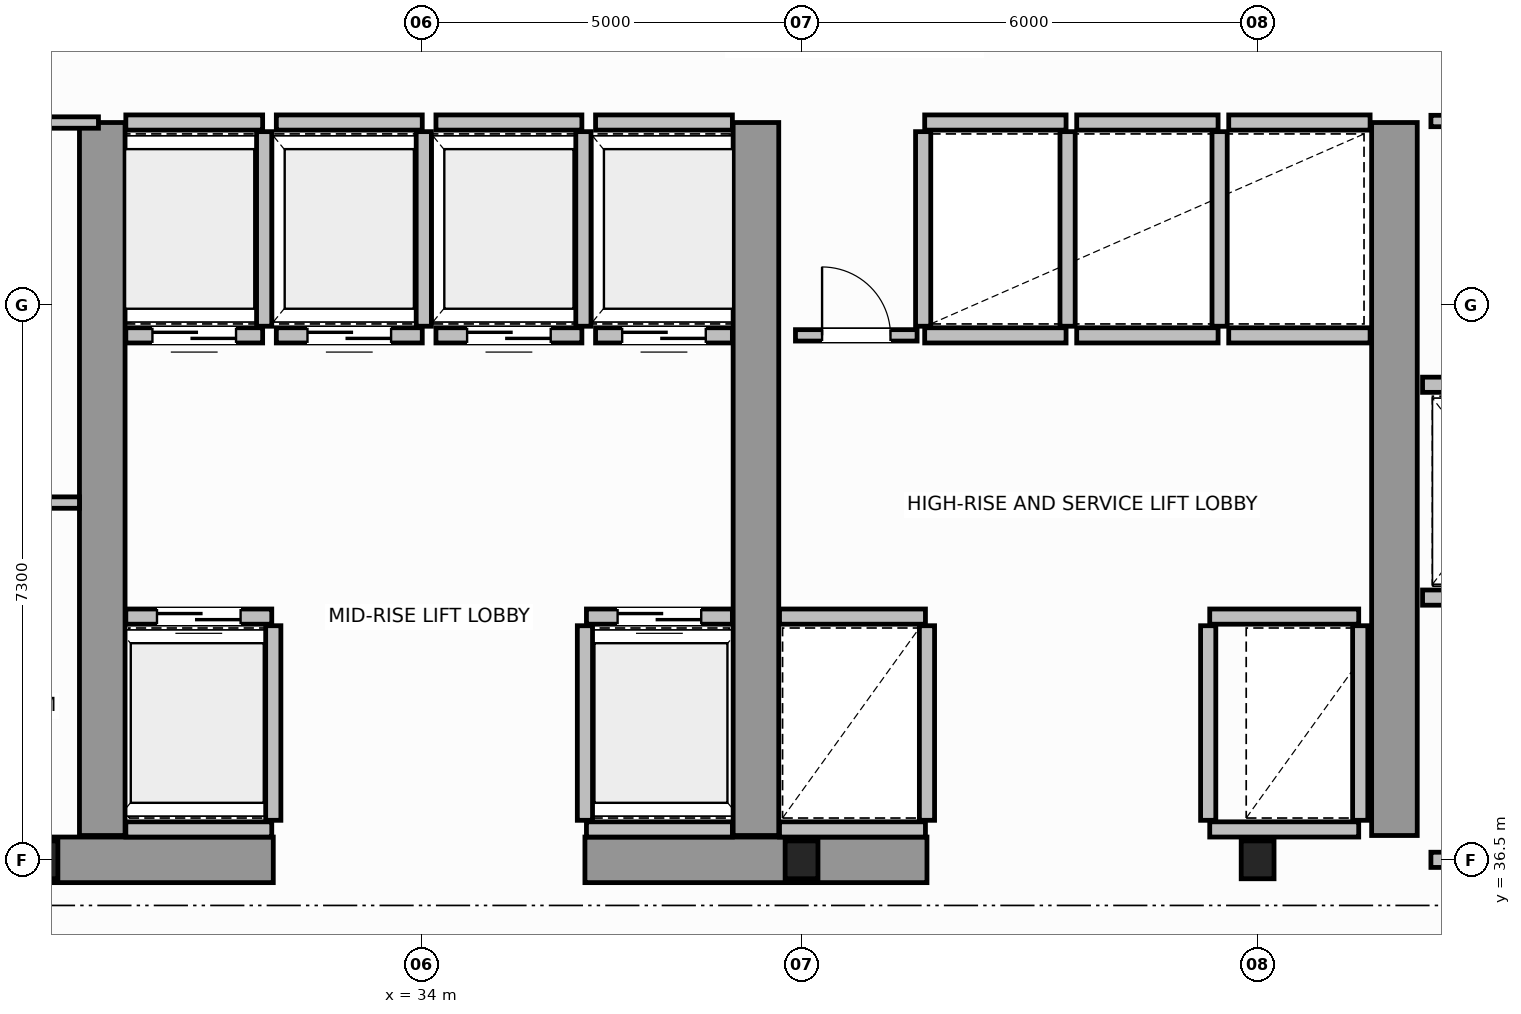
"""IFC4 building model, lengths in metres.
Left out: names, types, materials, properties, quantities, classifications, styles, units other than length and angle.
Written with IfcOpenShell. Run it as: python <this file> out.ifc"""

import sys

from ifc_helpers import new_model, si_unit, direction, frame, frame_2d, origin, origin_2d, place, context, subcontext, project, spatial, rectangle, i_section, extrude, source, transform, mapped, element, fill, save


model = new_model("IFC4")
c1 = context("Model", 3, precision=1e-05, world=origin(), true_north=direction((0.0, 1.0)))
c2 = subcontext(c1, "Body", "Model", "MODEL_VIEW")
j1 = project(units=[si_unit("LENGTHUNIT", "METRE"), si_unit("PLANEANGLEUNIT", "RADIAN")], contexts=[c1])
p1 = place(None, origin())
s1 = spatial("IfcSite", under=j1, at=p1, CompositionType="ELEMENT")
p2 = place(p1, origin())
s2 = spatial("IfcBuilding", under=s1, at=p2, CompositionType="ELEMENT")
p3 = place(p2, frame((0.0, 0.0, 180.4)))
s3 = spatial("IfcBuildingStorey", under=s2, at=p3, CompositionType="ELEMENT", Elevation=180.4)
m1 = source(origin(), c2, "Body", "SweptSolid", [
    extrude(i_section(OverallWidth=0.432, OverallDepth=0.498, WebThickness=0.055, FlangeThickness=0.068, FilletRadius=0.015, at=origin_2d()), origin(), (0.0, 0.0, 1.0), 3.8),
])
for number, where, z_axis, x_axis in (
    (1, (29.0, 36.5, 0.0), (0.0, 0.0, 1.0), (1.0, 0.0, 0.0)),
    (2, (39.0, 36.5, 0.0), (0.0, 0.0, 1.0), (1.0, 0.0, 0.0)),
    (3, (45.0, 36.5, 0.0), (0.0, 0.0, 1.0), (1.0, 0.0, 0.0)),
):
    element("IfcColumn", number, at=place(p3, frame(where, z_axis=z_axis, x_axis=x_axis)), inside=s3, PredefinedType="COLUMN", context=c2, shape_type="MappedRepresentation", body=[
        mapped(m1, transform((0.0, 0.0, 0.0), scale=1.0)),
    ])
for number, where, z_axis, x_axis in (
    (4, (27.55, 36.5, 0.0), (0.0, 0.0, 1.0), (1.0, 0.0, 0.0)),
    (5, (36.15, 36.5, 0.0), (0.0, 0.0, 1.0), (1.0, 0.0, 0.0)),
):
    element("IfcWall", number, at=place(p3, frame(where, z_axis=z_axis, x_axis=x_axis)), inside=s3, PredefinedType="SHEAR", context=c2, shape_type="SweptSolid", body=[
        extrude(rectangle(XDim=4.5, YDim=0.6, at=frame_2d((2.25, 0.0))), origin(), (0.0, 0.0, 1.0), 3.8),
    ])
for number, where, z_axis, x_axis in (
    (6, (29.8, 36.82, 0.0), (0.0, 0.0, 1.0), (0.0, 1.0, 0.0)),
    (7, (38.4, 36.82, 0.0), (0.0, 0.0, 1.0), (0.0, 1.0, 0.0)),
    (8, (46.8, 36.82, 0.0), (0.0, 0.0, 1.0), (0.0, 1.0, 0.0)),
):
    element("IfcWall", number, at=place(p3, frame(where, z_axis=z_axis, x_axis=x_axis)), inside=s3, PredefinedType="SHEAR", context=c2, shape_type="SweptSolid", body=[
        extrude(rectangle(XDim=9.38, YDim=0.6, at=frame_2d((4.69, 0.0))), origin(), (0.0, 0.0, 1.0), 3.8),
    ])
p4 = place(p3, frame((47.28, 36.5, 0.0), z_axis=(0.0, 0.0, 1.0), x_axis=(1.0, 0.0, 0.0)))
e9 = element("IfcWall", 9, at=p4, inside=s3, PredefinedType="SOLIDWALL", context=c2, shape_type="SweptSolid", body=[
    extrude(rectangle(XDim=2.47, YDim=0.2, at=frame_2d((1.235, 0.0))), origin(), (0.0, 0.0, 1.0), 2.57),
])
p5 = place(p4, frame((0.65, 0.0, 0.0)))
e10 = element("IfcOpeningElement", 10, at=p5, cuts=e9, PredefinedType="OPENING", context=c2, shape_type="SweptSolid", body=[
    extrude(rectangle(XDim=1.1, YDim=2.15, at=frame_2d((0.55, 1.075))), frame((0.0, 0.11, 0.0), z_axis=(0.0, -1.0, 0.0), x_axis=(1.0, 0.0, 0.0)), (0.0, 0.0, 1.0), 0.22),
])
p6 = place(p3, frame((30.11, 39.7, 0.0), z_axis=(0.0, 0.0, 1.0), x_axis=(1.0, 0.0, 0.0)))
e11 = element("IfcWall", 11, at=p6, inside=s3, PredefinedType="SOLIDWALL", context=c2, shape_type="SweptSolid", body=[
    extrude(rectangle(XDim=1.92, YDim=0.2, at=frame_2d((0.96, 0.0))), origin(), (0.0, 0.0, 1.0), 3.58),
])
p7 = place(p6, frame((0.41, 0.0, 0.0)))
e12 = element("IfcOpeningElement", 12, at=p7, cuts=e11, PredefinedType="OPENING", context=c2, shape_type="SweptSolid", body=[
    extrude(rectangle(XDim=1.1, YDim=2.15, at=frame_2d((0.55, 1.075))), frame((0.0, 0.11, 0.0), z_axis=(0.0, -1.0, 0.0), x_axis=(1.0, 0.0, 0.0)), (0.0, 0.0, 1.0), 0.22),
])
p8 = place(p3, frame((30.11, 36.9, 0.0), z_axis=(0.0, 0.0, 1.0), x_axis=(1.0, 0.0, 0.0)))
e13 = element("IfcWall", 13, at=p8, inside=s3, PredefinedType="SOLIDWALL", context=c2, shape_type="SweptSolid", body=[
    extrude(rectangle(XDim=1.92, YDim=0.2, at=frame_2d((0.96, 0.0))), origin(), (0.0, 0.0, 1.0), 3.58),
])
p9 = place(p3, frame((32.05, 37.02, 0.0), z_axis=(0.0, 0.0, 1.0), x_axis=(0.0, 1.0, 0.0)))
e14 = element("IfcWall", 14, at=p9, inside=s3, PredefinedType="SOLIDWALL", context=c2, shape_type="SweptSolid", body=[
    extrude(rectangle(XDim=2.56, YDim=0.2, at=frame_2d((1.28, 0.0))), origin(), (0.0, 0.0, 1.0), 3.58),
])
p10 = place(p3, frame((36.17, 39.7, 0.0), z_axis=(0.0, 0.0, 1.0), x_axis=(1.0, 0.0, 0.0)))
e15 = element("IfcWall", 15, at=p10, inside=s3, PredefinedType="SOLIDWALL", context=c2, shape_type="SweptSolid", body=[
    extrude(rectangle(XDim=1.92, YDim=0.2, at=frame_2d((0.96, 0.0))), origin(), (0.0, 0.0, 1.0), 3.58),
])
p11 = place(p10, frame((0.41, 0.0, 0.0)))
e16 = element("IfcOpeningElement", 16, at=p11, cuts=e15, PredefinedType="OPENING", context=c2, shape_type="SweptSolid", body=[
    extrude(rectangle(XDim=1.1, YDim=2.15, at=frame_2d((0.55, 1.075))), frame((0.0, 0.11, 0.0), z_axis=(0.0, -1.0, 0.0), x_axis=(1.0, 0.0, 0.0)), (0.0, 0.0, 1.0), 0.22),
])
p12 = place(p3, frame((36.17, 36.9, 0.0), z_axis=(0.0, 0.0, 1.0), x_axis=(1.0, 0.0, 0.0)))
e17 = element("IfcWall", 17, at=p12, inside=s3, PredefinedType="SOLIDWALL", context=c2, shape_type="SweptSolid", body=[
    extrude(rectangle(XDim=1.92, YDim=0.2, at=frame_2d((0.96, 0.0))), origin(), (0.0, 0.0, 1.0), 3.58),
])
p13 = place(p3, frame((36.15, 37.02, 0.0), z_axis=(0.0, 0.0, 1.0), x_axis=(0.0, 1.0, 0.0)))
e18 = element("IfcWall", 18, at=p13, inside=s3, PredefinedType="SOLIDWALL", context=c2, shape_type="SweptSolid", body=[
    extrude(rectangle(XDim=2.56, YDim=0.2, at=frame_2d((1.28, 0.0))), origin(), (0.0, 0.0, 1.0), 3.58),
])
p14 = place(p3, frame((30.11, 43.4, 0.0), z_axis=(0.0, 0.0, 1.0), x_axis=(1.0, 0.0, 0.0)))
e19 = element("IfcWall", 19, at=p14, inside=s3, PredefinedType="SOLIDWALL", context=c2, shape_type="SweptSolid", body=[
    extrude(rectangle(XDim=1.8, YDim=0.2, at=frame_2d((0.9, 0.0))), origin(), (0.0, 0.0, 1.0), 3.58),
])
p15 = place(p14, frame((0.35, 0.0, 0.0)))
e20 = element("IfcOpeningElement", 20, at=p15, cuts=e19, PredefinedType="OPENING", context=c2, shape_type="SweptSolid", body=[
    extrude(rectangle(XDim=1.1, YDim=2.15, at=frame_2d((0.55, 1.075))), frame((0.0, 0.11, 0.0), z_axis=(0.0, -1.0, 0.0), x_axis=(1.0, 0.0, 0.0)), (0.0, 0.0, 1.0), 0.22),
])
p16 = place(p3, frame((30.11, 46.2, 0.0), z_axis=(0.0, 0.0, 1.0), x_axis=(1.0, 0.0, 0.0)))
e21 = element("IfcWall", 21, at=p16, inside=s3, PredefinedType="SOLIDWALL", context=c2, shape_type="SweptSolid", body=[
    extrude(rectangle(XDim=1.8, YDim=0.2, at=frame_2d((0.9, 0.0))), origin(), (0.0, 0.0, 1.0), 3.58),
])
p17 = place(p3, frame((31.93, 43.52, 0.0), z_axis=(0.0, 0.0, 1.0), x_axis=(0.0, 1.0, 0.0)))
e22 = element("IfcWall", 22, at=p17, inside=s3, PredefinedType="SOLIDWALL", context=c2, shape_type="SweptSolid", body=[
    extrude(rectangle(XDim=2.56, YDim=0.2, at=frame_2d((1.28, 0.0))), origin(), (0.0, 0.0, 1.0), 3.58),
])
p18 = place(p3, frame((32.09, 43.4, 0.0), z_axis=(0.0, 0.0, 1.0), x_axis=(1.0, 0.0, 0.0)))
e23 = element("IfcWall", 23, at=p18, inside=s3, PredefinedType="SOLIDWALL", context=c2, shape_type="SweptSolid", body=[
    extrude(rectangle(XDim=1.92, YDim=0.2, at=frame_2d((0.96, 0.0))), origin(), (0.0, 0.0, 1.0), 3.58),
])
p19 = place(p18, frame((0.41, 0.0, 0.0)))
e24 = element("IfcOpeningElement", 24, at=p19, cuts=e23, PredefinedType="OPENING", context=c2, shape_type="SweptSolid", body=[
    extrude(rectangle(XDim=1.1, YDim=2.15, at=frame_2d((0.55, 1.075))), frame((0.0, 0.11, 0.0), z_axis=(0.0, -1.0, 0.0), x_axis=(1.0, 0.0, 0.0)), (0.0, 0.0, 1.0), 0.22),
])
p20 = place(p3, frame((32.09, 46.2, 0.0), z_axis=(0.0, 0.0, 1.0), x_axis=(1.0, 0.0, 0.0)))
e25 = element("IfcWall", 25, at=p20, inside=s3, PredefinedType="SOLIDWALL", context=c2, shape_type="SweptSolid", body=[
    extrude(rectangle(XDim=1.92, YDim=0.2, at=frame_2d((0.96, 0.0))), origin(), (0.0, 0.0, 1.0), 3.58),
])
p21 = place(p3, frame((34.03, 43.52, 0.0), z_axis=(0.0, 0.0, 1.0), x_axis=(0.0, 1.0, 0.0)))
e26 = element("IfcWall", 26, at=p21, inside=s3, PredefinedType="SOLIDWALL", context=c2, shape_type="SweptSolid", body=[
    extrude(rectangle(XDim=2.56, YDim=0.2, at=frame_2d((1.28, 0.0))), origin(), (0.0, 0.0, 1.0), 3.58),
])
p22 = place(p3, frame((34.19, 43.4, 0.0), z_axis=(0.0, 0.0, 1.0), x_axis=(1.0, 0.0, 0.0)))
e27 = element("IfcWall", 27, at=p22, inside=s3, PredefinedType="SOLIDWALL", context=c2, shape_type="SweptSolid", body=[
    extrude(rectangle(XDim=1.92, YDim=0.2, at=frame_2d((0.96, 0.0))), origin(), (0.0, 0.0, 1.0), 3.58),
])
p23 = place(p22, frame((0.41, 0.0, 0.0)))
e28 = element("IfcOpeningElement", 28, at=p23, cuts=e27, PredefinedType="OPENING", context=c2, shape_type="SweptSolid", body=[
    extrude(rectangle(XDim=1.1, YDim=2.15, at=frame_2d((0.55, 1.075))), frame((0.0, 0.11, 0.0), z_axis=(0.0, -1.0, 0.0), x_axis=(1.0, 0.0, 0.0)), (0.0, 0.0, 1.0), 0.22),
])
p24 = place(p3, frame((34.19, 46.2, 0.0), z_axis=(0.0, 0.0, 1.0), x_axis=(1.0, 0.0, 0.0)))
e29 = element("IfcWall", 29, at=p24, inside=s3, PredefinedType="SOLIDWALL", context=c2, shape_type="SweptSolid", body=[
    extrude(rectangle(XDim=1.92, YDim=0.2, at=frame_2d((0.96, 0.0))), origin(), (0.0, 0.0, 1.0), 3.58),
])
p25 = place(p3, frame((36.13, 43.52, 0.0), z_axis=(0.0, 0.0, 1.0), x_axis=(0.0, 1.0, 0.0)))
e30 = element("IfcWall", 30, at=p25, inside=s3, PredefinedType="SOLIDWALL", context=c2, shape_type="SweptSolid", body=[
    extrude(rectangle(XDim=2.56, YDim=0.2, at=frame_2d((1.28, 0.0))), origin(), (0.0, 0.0, 1.0), 3.58),
])
p26 = place(p3, frame((36.29, 43.4, 0.0), z_axis=(0.0, 0.0, 1.0), x_axis=(1.0, 0.0, 0.0)))
e31 = element("IfcWall", 31, at=p26, inside=s3, PredefinedType="SOLIDWALL", context=c2, shape_type="SweptSolid", body=[
    extrude(rectangle(XDim=1.8, YDim=0.2, at=frame_2d((0.9, 0.0))), origin(), (0.0, 0.0, 1.0), 3.58),
])
p27 = place(p26, frame((0.35, 0.0, 0.0)))
e32 = element("IfcOpeningElement", 32, at=p27, cuts=e31, PredefinedType="OPENING", context=c2, shape_type="SweptSolid", body=[
    extrude(rectangle(XDim=1.1, YDim=2.15, at=frame_2d((0.55, 1.075))), frame((0.0, 0.11, 0.0), z_axis=(0.0, -1.0, 0.0), x_axis=(1.0, 0.0, 0.0)), (0.0, 0.0, 1.0), 0.22),
])
p28 = place(p3, frame((36.29, 46.2, 0.0), z_axis=(0.0, 0.0, 1.0), x_axis=(1.0, 0.0, 0.0)))
e33 = element("IfcWall", 33, at=p28, inside=s3, PredefinedType="SOLIDWALL", context=c2, shape_type="SweptSolid", body=[
    extrude(rectangle(XDim=1.8, YDim=0.2, at=frame_2d((0.9, 0.0))), origin(), (0.0, 0.0, 1.0), 3.58),
])
for number, where, z_axis, x_axis in (
    (34, (38.71, 39.7, 0.0), (0.0, 0.0, 1.0), (1.0, 0.0, 0.0)),
    (35, (38.71, 36.9, 0.0), (0.0, 0.0, 1.0), (1.0, 0.0, 0.0)),
):
    element("IfcWall", number, at=place(p3, frame(where, z_axis=z_axis, x_axis=x_axis)), inside=s3, PredefinedType="SOLIDWALL", context=c2, shape_type="SweptSolid", body=[
        extrude(rectangle(XDim=1.92, YDim=0.2, at=frame_2d((0.96, 0.0))), origin(), (0.0, 0.0, 1.0), 3.58),
    ])
p29 = place(p3, frame((40.65, 37.02, 0.0), z_axis=(0.0, 0.0, 1.0), x_axis=(0.0, 1.0, 0.0)))
e36 = element("IfcWall", 36, at=p29, inside=s3, PredefinedType="SOLIDWALL", context=c2, shape_type="SweptSolid", body=[
    extrude(rectangle(XDim=2.56, YDim=0.2, at=frame_2d((1.28, 0.0))), origin(), (0.0, 0.0, 1.0), 3.58),
])
p30 = place(p3, frame((44.37, 39.7, 0.0), z_axis=(0.0, 0.0, 1.0), x_axis=(1.0, 0.0, 0.0)))
e37 = element("IfcWall", 37, at=p30, inside=s3, PredefinedType="SOLIDWALL", context=c2, shape_type="SweptSolid", body=[
    extrude(rectangle(XDim=1.96, YDim=0.2, at=frame_2d((0.98, 0.0))), origin(), (0.0, 0.0, 1.0), 3.58),
])
p31 = place(p3, frame((44.37, 36.9, 0.0), z_axis=(0.0, 0.0, 1.0), x_axis=(1.0, 0.0, 0.0)))
e38 = element("IfcWall", 38, at=p31, inside=s3, PredefinedType="SOLIDWALL", context=c2, shape_type="SweptSolid", body=[
    extrude(rectangle(XDim=1.96, YDim=0.2, at=frame_2d((0.98, 0.0))), origin(), (0.0, 0.0, 1.0), 2.57),
])
for number, where, z_axis, x_axis in (
    (39, (44.35, 37.02, 0.0), (0.0, 0.0, 1.0), (0.0, 1.0, 0.0)),
    (40, (46.35, 37.02, 0.0), (0.0, 0.0, 1.0), (0.0, 1.0, 0.0)),
):
    element("IfcWall", number, at=place(p3, frame(where, z_axis=z_axis, x_axis=x_axis)), inside=s3, PredefinedType="SOLIDWALL", context=c2, shape_type="SweptSolid", body=[
        extrude(rectangle(XDim=2.56, YDim=0.2, at=frame_2d((1.28, 0.0))), origin(), (0.0, 0.0, 1.0), 3.58),
    ])
for number, where, z_axis, x_axis in (
    (41, (40.62, 43.4, 0.0), (0.0, 0.0, 1.0), (1.0, 0.0, 0.0)),
    (42, (40.62, 46.2, 0.0), (0.0, 0.0, 1.0), (1.0, 0.0, 0.0)),
):
    element("IfcWall", number, at=place(p3, frame(where, z_axis=z_axis, x_axis=x_axis)), inside=s3, PredefinedType="SOLIDWALL", context=c2, shape_type="SweptSolid", body=[
        extrude(rectangle(XDim=1.86, YDim=0.2, at=frame_2d((0.93, 0.0))), origin(), (0.0, 0.0, 1.0), 3.58),
    ])
for number, where, z_axis, x_axis in (
    (43, (40.6, 43.52, 0.0), (0.0, 0.0, 1.0), (0.0, 1.0, 0.0)),
    (44, (42.5, 43.52, 0.0), (0.0, 0.0, 1.0), (0.0, 1.0, 0.0)),
):
    element("IfcWall", number, at=place(p3, frame(where, z_axis=z_axis, x_axis=x_axis)), inside=s3, PredefinedType="SOLIDWALL", context=c2, shape_type="SweptSolid", body=[
        extrude(rectangle(XDim=2.56, YDim=0.2, at=frame_2d((1.28, 0.0))), origin(), (0.0, 0.0, 1.0), 3.58),
    ])
for number, where, z_axis, x_axis in (
    (45, (42.62, 43.4, 0.0), (0.0, 0.0, 1.0), (1.0, 0.0, 0.0)),
    (46, (42.62, 46.2, 0.0), (0.0, 0.0, 1.0), (1.0, 0.0, 0.0)),
):
    element("IfcWall", number, at=place(p3, frame(where, z_axis=z_axis, x_axis=x_axis)), inside=s3, PredefinedType="SOLIDWALL", context=c2, shape_type="SweptSolid", body=[
        extrude(rectangle(XDim=1.86, YDim=0.2, at=frame_2d((0.93, 0.0))), origin(), (0.0, 0.0, 1.0), 3.58),
    ])
p32 = place(p3, frame((44.5, 43.52, 0.0), z_axis=(0.0, 0.0, 1.0), x_axis=(0.0, 1.0, 0.0)))
e47 = element("IfcWall", 47, at=p32, inside=s3, PredefinedType="SOLIDWALL", context=c2, shape_type="SweptSolid", body=[
    extrude(rectangle(XDim=2.56, YDim=0.2, at=frame_2d((1.28, 0.0))), origin(), (0.0, 0.0, 1.0), 3.58),
])
for number, where, z_axis, x_axis in (
    (48, (44.62, 43.4, 0.0), (0.0, 0.0, 1.0), (1.0, 0.0, 0.0)),
    (49, (44.62, 46.2, 0.0), (0.0, 0.0, 1.0), (1.0, 0.0, 0.0)),
):
    element("IfcWall", number, at=place(p3, frame(where, z_axis=z_axis, x_axis=x_axis)), inside=s3, PredefinedType="SOLIDWALL", context=c2, shape_type="SweptSolid", body=[
        extrude(rectangle(XDim=1.86, YDim=0.2, at=frame_2d((0.93, 0.0))), origin(), (0.0, 0.0, 1.0), 3.58),
    ])
p33 = place(p3, frame((47.17, 39.95, 0.0), z_axis=(0.0, 0.0, 1.0), x_axis=(1.0, 0.0, 0.0)))
e50 = element("IfcWall", 50, at=p33, inside=s3, PredefinedType="SOLIDWALL", context=c2, shape_type="SweptSolid", body=[
    extrude(rectangle(XDim=2.16, YDim=0.2, at=frame_2d((1.08, 0.0))), origin(), (0.0, 0.0, 1.0), 3.58),
])
p34 = place(p33, frame((0.53, 0.0, 0.0)))
e51 = element("IfcOpeningElement", 51, at=p34, cuts=e50, PredefinedType="OPENING", context=c2, shape_type="SweptSolid", body=[
    extrude(rectangle(XDim=1.1, YDim=2.15, at=frame_2d((0.55, 1.075))), frame((0.0, 0.11, 0.0), z_axis=(0.0, -1.0, 0.0), x_axis=(1.0, 0.0, 0.0)), (0.0, 0.0, 1.0), 0.22),
])
p35 = place(p3, frame((47.17, 42.75, 0.0), z_axis=(0.0, 0.0, 1.0), x_axis=(1.0, 0.0, 0.0)))
e52 = element("IfcWall", 52, at=p35, inside=s3, PredefinedType="SOLIDWALL", context=c2, shape_type="SweptSolid", body=[
    extrude(rectangle(XDim=2.16, YDim=0.2, at=frame_2d((1.08, 0.0))), origin(), (0.0, 0.0, 1.0), 3.58),
])
p36 = place(p3, frame((21.25, 46.2, 0.0), z_axis=(0.0, 0.0, 1.0), x_axis=(1.0, 0.0, 0.0)))
e53 = element("IfcWall", 53, at=p36, inside=s3, PredefinedType="PARTITIONING", context=c2, shape_type="SweptSolid", body=[
    extrude(rectangle(XDim=8.5, YDim=0.15, at=frame_2d((4.25, 0.0))), origin(), (0.0, 0.0, 1.0), 3.58),
])
p37 = place(p3, frame((21.5, 41.2, 0.0), z_axis=(0.0, 0.0, 1.0), x_axis=(1.0, 0.0, 0.0)))
e54 = element("IfcWall", 54, at=p37, inside=s3, PredefinedType="PARTITIONING", context=c2, shape_type="SweptSolid", body=[
    extrude(rectangle(XDim=8.0, YDim=0.15, at=frame_2d((4.0, 0.0))), origin(), (0.0, 0.0, 1.0), 3.58),
])
p38 = place(p37, frame((3.4, 0.0, 0.0)))
e55 = element("IfcOpeningElement", 55, at=p38, cuts=e54, PredefinedType="OPENING", context=c2, shape_type="SweptSolid", body=[
    extrude(rectangle(XDim=0.9, YDim=2.1, at=frame_2d((0.45, 1.05))), frame((0.0, 0.085, 0.0), z_axis=(0.0, -1.0, 0.0), x_axis=(1.0, 0.0, 0.0)), (0.0, 0.0, 1.0), 0.17),
])
p39 = place(p3, frame((47.28, 46.22, 0.0), z_axis=(0.0, 0.0, 1.0), x_axis=(1.0, 0.0, 0.0)))
e56 = element("IfcWall", 56, at=p39, inside=s3, PredefinedType="PARTITIONING", context=c2, shape_type="SweptSolid", body=[
    extrude(rectangle(XDim=2.1, YDim=0.15, at=frame_2d((1.05, 0.0))), origin(), (0.0, 0.0, 1.0), 3.58),
])
p40 = place(p39, frame((0.55, 0.0, 0.0)))
e57 = element("IfcOpeningElement", 57, at=p40, cuts=e56, PredefinedType="OPENING", context=c2, shape_type="SweptSolid", body=[
    extrude(rectangle(XDim=0.9, YDim=2.1, at=frame_2d((0.45, 1.05))), frame((0.0, 0.085, 0.0), z_axis=(0.0, -1.0, 0.0), x_axis=(1.0, 0.0, 0.0)), (0.0, 0.0, 1.0), 0.17),
])
p41 = place(p3, frame((38.92, 43.4, 0.0), z_axis=(0.0, 0.0, 1.0), x_axis=(1.0, 0.0, 0.0)))
e58 = element("IfcWall", 58, at=p41, inside=s3, PredefinedType="PARTITIONING", context=c2, shape_type="SweptSolid", body=[
    extrude(rectangle(XDim=1.6, YDim=0.15, at=frame_2d((0.8, 0.0))), origin(), (0.0, 0.0, 1.0), 3.58),
])
p42 = place(p41, frame((0.35, 0.0, 0.0)))
e59 = element("IfcOpeningElement", 59, at=p42, cuts=e58, PredefinedType="OPENING", context=c2, shape_type="SweptSolid", body=[
    extrude(rectangle(XDim=0.9, YDim=2.1, at=frame_2d((0.45, 1.05))), frame((0.0, 0.085, 0.0), z_axis=(0.0, -1.0, 0.0), x_axis=(1.0, 0.0, 0.0)), (0.0, 0.0, 1.0), 0.17),
])
m2 = source(origin(), c2, "Body", "SweptSolid", [
    extrude(rectangle(XDim=1.1, YDim=2.15, at=frame_2d((0.55, 1.075))), frame((0.0, 0.025, 0.0), z_axis=(0.0, -1.0, 0.0), x_axis=(1.0, 0.0, 0.0)), (0.0, 0.0, 1.0), 0.05),
])
p43 = place(p7, origin())
e60 = element("IfcDoor", 60, at=p43, inside=s3, OperationType="DOUBLE_DOOR_SLIDING", PredefinedType="DOOR", context=c2, shape_type="MappedRepresentation", body=[
    mapped(m2, transform((0.0, 0.0, 0.0), scale=1.0)),
])
fill(e12, e60)
p44 = place(p11, origin())
e61 = element("IfcDoor", 61, at=p44, inside=s3, OperationType="DOUBLE_DOOR_SLIDING", PredefinedType="DOOR", context=c2, shape_type="MappedRepresentation", body=[
    mapped(m2, transform((0.0, 0.0, 0.0), scale=1.0)),
])
fill(e16, e61)
p45 = place(p15, origin())
e62 = element("IfcDoor", 62, at=p45, inside=s3, OperationType="DOUBLE_DOOR_SLIDING", PredefinedType="DOOR", context=c2, shape_type="MappedRepresentation", body=[
    mapped(m2, transform((0.0, 0.0, 0.0), scale=1.0)),
])
fill(e20, e62)
p46 = place(p19, origin())
e63 = element("IfcDoor", 63, at=p46, inside=s3, OperationType="DOUBLE_DOOR_SLIDING", PredefinedType="DOOR", context=c2, shape_type="MappedRepresentation", body=[
    mapped(m2, transform((0.0, 0.0, 0.0), scale=1.0)),
])
fill(e24, e63)
p47 = place(p23, origin())
e64 = element("IfcDoor", 64, at=p47, inside=s3, OperationType="DOUBLE_DOOR_SLIDING", PredefinedType="DOOR", context=c2, shape_type="MappedRepresentation", body=[
    mapped(m2, transform((0.0, 0.0, 0.0), scale=1.0)),
])
fill(e28, e64)
p48 = place(p27, origin())
e65 = element("IfcDoor", 65, at=p48, inside=s3, OperationType="DOUBLE_DOOR_SLIDING", PredefinedType="DOOR", context=c2, shape_type="MappedRepresentation", body=[
    mapped(m2, transform((0.0, 0.0, 0.0), scale=1.0)),
])
fill(e32, e65)
m3 = source(origin(), c2, "Body", "SweptSolid", [
    extrude(rectangle(XDim=0.9, YDim=2.1, at=frame_2d((0.45, 1.05))), frame((0.0, 0.025, 0.0), z_axis=(0.0, -1.0, 0.0), x_axis=(1.0, 0.0, 0.0)), (0.0, 0.0, 1.0), 0.05),
])
p49 = place(p42, origin())
e66 = element("IfcDoor", 66, at=p49, inside=s3, OperationType="SINGLE_SWING_LEFT", PredefinedType="DOOR", context=c2, shape_type="MappedRepresentation", body=[
    mapped(m3, transform((0.0, 0.0, 0.0), scale=1.0)),
])
fill(e59, e66)
save(model, sys.argv[1])
